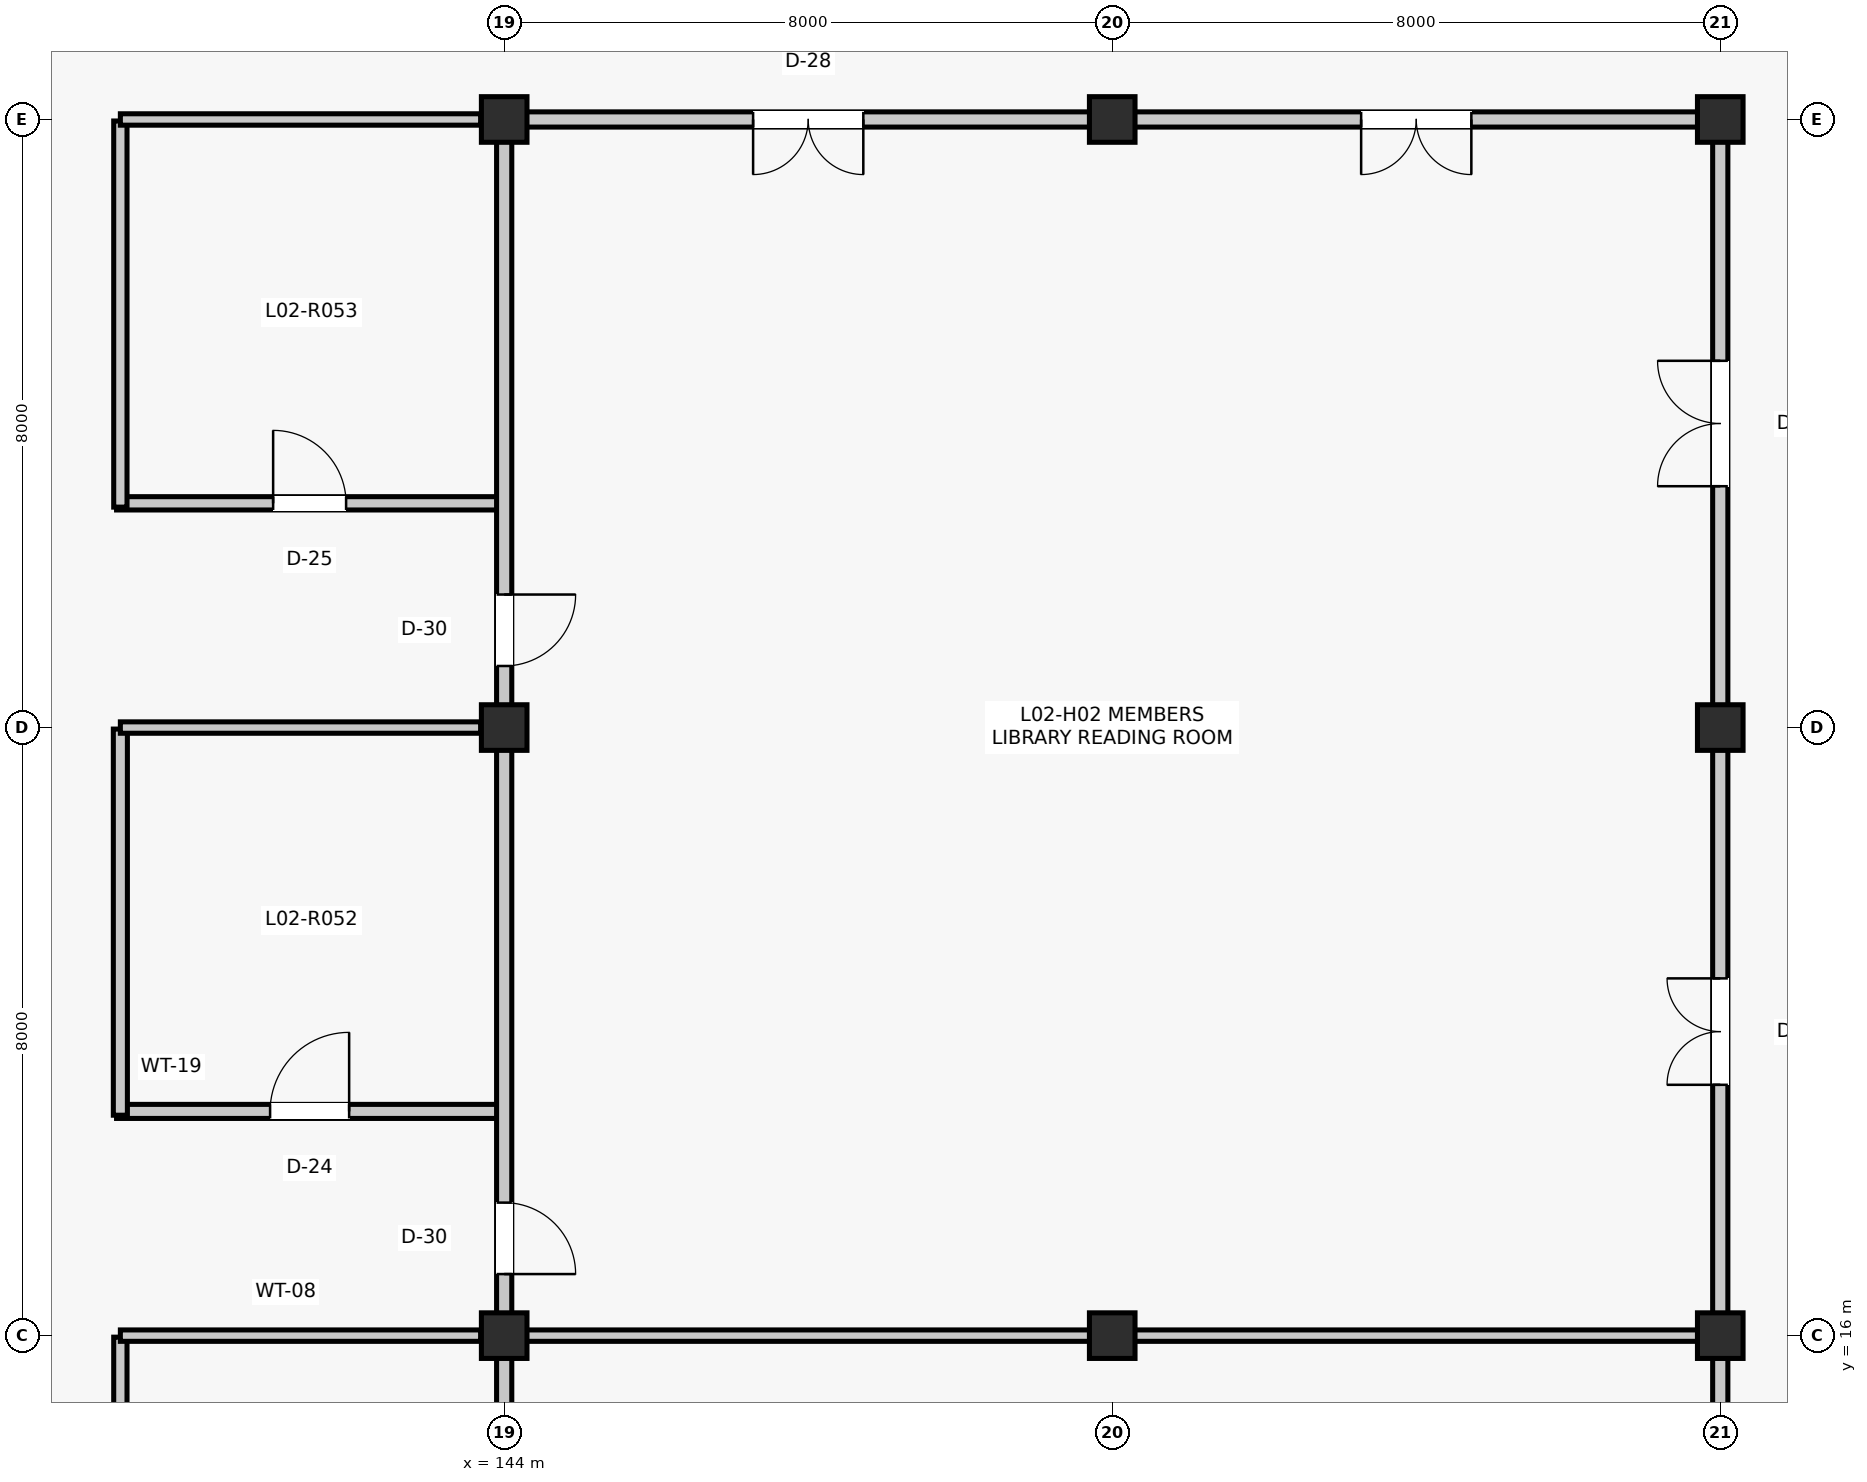
"""IFC4 building model, lengths in metres.
Left out: names, types, materials, properties, quantities, classifications, styles, units other than length and angle.
Written with IfcOpenShell. Run it as: python <this file> out.ifc"""

import sys

from ifc_helpers import new_model, si_unit, direction, frame, frame_2d, origin, origin_2d, place, context, subcontext, project, spatial, rectangle, extrude, element, fill, save


model = new_model("IFC4")
c1 = context("Model", 3, precision=1e-05, world=origin(), true_north=direction((0.0, 1.0)))
c2 = subcontext(c1, "Body", "Model", "MODEL_VIEW")
j1 = project(units=[si_unit("LENGTHUNIT", "METRE"), si_unit("PLANEANGLEUNIT", "RADIAN")], contexts=[c1])
p1 = place(None, origin())
s1 = spatial("IfcSite", under=j1, at=p1, CompositionType="ELEMENT")
p2 = place(p1, origin())
s2 = spatial("IfcBuilding", under=s1, at=p2, CompositionType="ELEMENT")
p3 = place(p2, frame((0.0, 0.0, 9.9)))
s3 = spatial("IfcBuildingStorey", under=s2, at=p3, CompositionType="ELEMENT", Elevation=9.9)
for number, where, z_axis, x_axis in (
    (1, (144.0, 16.0, 0.0), (0.0, 0.0, 1.0), (1.0, 0.0, 0.0)),
    (2, (144.0, 24.0, 0.0), (0.0, 0.0, 1.0), (1.0, 0.0, 0.0)),
    (3, (144.0, 32.0, 0.0), (0.0, 0.0, 1.0), (1.0, 0.0, 0.0)),
    (4, (152.0, 16.0, 0.0), (0.0, 0.0, 1.0), (1.0, 0.0, 0.0)),
    (5, (152.0, 32.0, 0.0), (0.0, 0.0, 1.0), (1.0, 0.0, 0.0)),
    (6, (160.0, 16.0, 0.0), (0.0, 0.0, 1.0), (1.0, 0.0, 0.0)),
    (7, (160.0, 24.0, 0.0), (0.0, 0.0, 1.0), (1.0, 0.0, 0.0)),
    (8, (160.0, 32.0, 0.0), (0.0, 0.0, 1.0), (1.0, 0.0, 0.0)),
):
    element("IfcColumn", number, at=place(p3, frame(where, z_axis=z_axis, x_axis=x_axis)), inside=s3, PredefinedType="COLUMN", context=c2, shape_type="SweptSolid", body=[
        extrude(rectangle(XDim=0.6, YDim=0.6, at=origin_2d()), origin(), (0.0, 0.0, 1.0), 3.96),
    ])
p4 = place(p3, frame((138.95, 10.9, 0.0), z_axis=(0.0, 0.0, 1.0), x_axis=(0.0, 1.0, 0.0)))
e9 = element("IfcWall", 9, at=p4, inside=s3, PredefinedType="PARTITIONING", context=c2, shape_type="SweptSolid", body=[
    extrude(rectangle(XDim=5.08, YDim=0.175, at=frame_2d((2.54, 0.0))), origin(), (0.0, 0.0, 1.0), 3.151),
])
p5 = place(p3, frame((138.95, 16.0, 0.0), z_axis=(0.0, 0.0, 1.0), x_axis=(1.0, 0.0, 0.0)))
e10 = element("IfcWall", 10, at=p5, inside=s3, PredefinedType="PARTITIONING", context=c2, shape_type="SweptSolid", body=[
    extrude(rectangle(XDim=4.74, YDim=0.15, at=frame_2d((2.37, 0.0))), origin(), (0.0, 0.0, 1.0), 3.151),
])
p6 = place(p3, frame((138.9, 18.95, 0.0), z_axis=(0.0, 0.0, 1.0), x_axis=(1.0, 0.0, 0.0)))
e11 = element("IfcWall", 11, at=p6, inside=s3, PredefinedType="PARTITIONING", context=c2, shape_type="SweptSolid", body=[
    extrude(rectangle(XDim=5.08, YDim=0.185, at=frame_2d((2.54, 0.0))), origin(), (0.0, 0.0, 1.0), 3.157),
])
p7 = place(p6, frame((2.02, 0.0, 0.0)))
e12 = element("IfcOpeningElement", 12, at=p7, cuts=e11, PredefinedType="OPENING", context=c2, shape_type="SweptSolid", body=[
    extrude(rectangle(XDim=1.04, YDim=2.18, at=frame_2d((0.52, 1.09))), frame((0.0, 0.103, 0.0), z_axis=(0.0, -1.0, 0.0), x_axis=(1.0, 0.0, 0.0)), (0.0, 0.0, 1.0), 0.205),
])
p8 = place(p3, frame((138.95, 18.9, 0.0), z_axis=(0.0, 0.0, 1.0), x_axis=(0.0, 1.0, 0.0)))
e13 = element("IfcWall", 13, at=p8, inside=s3, PredefinedType="PARTITIONING", context=c2, shape_type="SweptSolid", body=[
    extrude(rectangle(XDim=5.08, YDim=0.185, at=frame_2d((2.54, 0.0))), origin(), (0.0, 0.0, 1.0), 3.082),
])
p9 = place(p3, frame((138.95, 24.0, 0.0), z_axis=(0.0, 0.0, 1.0), x_axis=(1.0, 0.0, 0.0)))
e14 = element("IfcWall", 14, at=p9, inside=s3, PredefinedType="PARTITIONING", context=c2, shape_type="SweptSolid", body=[
    extrude(rectangle(XDim=4.74, YDim=0.15, at=frame_2d((2.37, 0.0))), origin(), (0.0, 0.0, 1.0), 3.082),
])
p10 = place(p3, frame((138.9, 26.95, 0.0), z_axis=(0.0, 0.0, 1.0), x_axis=(1.0, 0.0, 0.0)))
e15 = element("IfcWall", 15, at=p10, inside=s3, PredefinedType="PARTITIONING", context=c2, shape_type="SweptSolid", body=[
    extrude(rectangle(XDim=5.08, YDim=0.175, at=frame_2d((2.54, 0.0))), origin(), (0.0, 0.0, 1.0), 3.227),
])
p11 = place(p10, frame((2.06, 0.0, 0.0)))
e16 = element("IfcOpeningElement", 16, at=p11, cuts=e15, PredefinedType="OPENING", context=c2, shape_type="SweptSolid", body=[
    extrude(rectangle(XDim=0.96, YDim=2.14, at=frame_2d((0.48, 1.07))), frame((0.0, 0.097, 0.0), z_axis=(0.0, -1.0, 0.0), x_axis=(1.0, 0.0, 0.0)), (0.0, 0.0, 1.0), 0.195),
])
p12 = place(p3, frame((138.95, 26.9, 0.0), z_axis=(0.0, 0.0, 1.0), x_axis=(0.0, 1.0, 0.0)))
e17 = element("IfcWall", 17, at=p12, inside=s3, PredefinedType="PARTITIONING", context=c2, shape_type="SweptSolid", body=[
    extrude(rectangle(XDim=5.08, YDim=0.175, at=frame_2d((2.54, 0.0))), origin(), (0.0, 0.0, 1.0), 3.157),
])
p13 = place(p3, frame((138.95, 32.0, 0.0), z_axis=(0.0, 0.0, 1.0), x_axis=(1.0, 0.0, 0.0)))
e18 = element("IfcWall", 18, at=p13, inside=s3, PredefinedType="PARTITIONING", context=c2, shape_type="SweptSolid", body=[
    extrude(rectangle(XDim=4.74, YDim=0.15, at=frame_2d((2.37, 0.0))), origin(), (0.0, 0.0, 1.0), 3.157),
])
p14 = place(p3, frame((144.0, 8.29, 0.0), z_axis=(0.0, 0.0, 1.0), x_axis=(0.0, 1.0, 0.0)))
e19 = element("IfcWall", 19, at=p14, inside=s3, PredefinedType="PARTITIONING", context=c2, shape_type="SweptSolid", body=[
    extrude(rectangle(XDim=7.42, YDim=0.2, at=frame_2d((3.71, 0.0))), origin(), (0.0, 0.0, 1.0), 3.221),
])
p15 = place(p14, frame((0.52, 0.0, 0.0)))
e20 = element("IfcOpeningElement", 20, at=p15, cuts=e19, PredefinedType="OPENING", context=c2, shape_type="SweptSolid", body=[
    extrude(rectangle(XDim=0.94, YDim=2.12, at=frame_2d((0.47, 1.06))), frame((0.0, 0.11, 0.0), z_axis=(0.0, -1.0, 0.0), x_axis=(1.0, 0.0, 0.0)), (0.0, 0.0, 1.0), 0.22),
])
p16 = place(p3, frame((144.0, 16.29, 0.0), z_axis=(0.0, 0.0, 1.0), x_axis=(0.0, 1.0, 0.0)))
e21 = element("IfcWall", 21, at=p16, inside=s3, PredefinedType="PARTITIONING", context=c2, shape_type="SweptSolid", body=[
    extrude(rectangle(XDim=7.42, YDim=0.2, at=frame_2d((3.71, 0.0))), origin(), (0.0, 0.0, 1.0), 3.157),
])
p17 = place(p16, frame((0.52, 0.0, 0.0)))
e22 = element("IfcOpeningElement", 22, at=p17, cuts=e21, PredefinedType="OPENING", context=c2, shape_type="SweptSolid", body=[
    extrude(rectangle(XDim=0.94, YDim=2.12, at=frame_2d((0.47, 1.06))), frame((0.0, 0.11, 0.0), z_axis=(0.0, -1.0, 0.0), x_axis=(1.0, 0.0, 0.0)), (0.0, 0.0, 1.0), 0.22),
])
p18 = place(p3, frame((144.0, 24.29, 0.0), z_axis=(0.0, 0.0, 1.0), x_axis=(0.0, 1.0, 0.0)))
e23 = element("IfcWall", 23, at=p18, inside=s3, PredefinedType="PARTITIONING", context=c2, shape_type="SweptSolid", body=[
    extrude(rectangle(XDim=7.42, YDim=0.2, at=frame_2d((3.71, 0.0))), origin(), (0.0, 0.0, 1.0), 3.227),
])
p19 = place(p18, frame((0.52, 0.0, 0.0)))
e24 = element("IfcOpeningElement", 24, at=p19, cuts=e23, PredefinedType="OPENING", context=c2, shape_type="SweptSolid", body=[
    extrude(rectangle(XDim=0.94, YDim=2.12, at=frame_2d((0.47, 1.06))), frame((0.0, 0.11, 0.0), z_axis=(0.0, -1.0, 0.0), x_axis=(1.0, 0.0, 0.0)), (0.0, 0.0, 1.0), 0.22),
])
p20 = place(p3, frame((144.29, 16.0, 0.0), z_axis=(0.0, 0.0, 1.0), x_axis=(1.0, 0.0, 0.0)))
e25 = element("IfcWall", 25, at=p20, inside=s3, PredefinedType="PARTITIONING", context=c2, shape_type="SweptSolid", body=[
    extrude(rectangle(XDim=7.42, YDim=0.15, at=frame_2d((3.71, 0.0))), origin(), (0.0, 0.0, 1.0), 3.082),
])
p21 = place(p3, frame((144.29, 32.0, 0.0), z_axis=(0.0, 0.0, 1.0), x_axis=(1.0, 0.0, 0.0)))
e26 = element("IfcWall", 26, at=p21, inside=s3, PredefinedType="PARTITIONING", context=c2, shape_type="SweptSolid", body=[
    extrude(rectangle(XDim=7.42, YDim=0.2, at=frame_2d((3.71, 0.0))), origin(), (0.0, 0.0, 1.0), 3.156),
])
p22 = place(p21, frame((2.985, 0.0, 0.0)))
e27 = element("IfcOpeningElement", 27, at=p22, cuts=e26, PredefinedType="OPENING", context=c2, shape_type="SweptSolid", body=[
    extrude(rectangle(XDim=1.45, YDim=2.22, at=frame_2d((0.725, 1.11))), frame((0.0, 0.11, 0.0), z_axis=(0.0, -1.0, 0.0), x_axis=(1.0, 0.0, 0.0)), (0.0, 0.0, 1.0), 0.22),
])
p23 = place(p3, frame((160.0, 8.29, 0.0), z_axis=(0.0, 0.0, 1.0), x_axis=(0.0, 1.0, 0.0)))
e28 = element("IfcWall", 28, at=p23, inside=s3, PredefinedType="PARTITIONING", context=c2, shape_type="SweptSolid", body=[
    extrude(rectangle(XDim=7.42, YDim=0.2, at=frame_2d((3.71, 0.0))), origin(), (0.0, 0.0, 1.0), 3.227),
])
p24 = place(p23, frame((3.06, 0.0, 0.0)))
e29 = element("IfcOpeningElement", 29, at=p24, cuts=e28, PredefinedType="OPENING", context=c2, shape_type="SweptSolid", body=[
    extrude(rectangle(XDim=1.3, YDim=2.2, at=frame_2d((0.65, 1.1))), frame((0.0, 0.11, 0.0), z_axis=(0.0, -1.0, 0.0), x_axis=(1.0, 0.0, 0.0)), (0.0, 0.0, 1.0), 0.22),
])
p25 = place(p3, frame((152.29, 16.0, 0.0), z_axis=(0.0, 0.0, 1.0), x_axis=(1.0, 0.0, 0.0)))
e30 = element("IfcWall", 30, at=p25, inside=s3, PredefinedType="PARTITIONING", context=c2, shape_type="SweptSolid", body=[
    extrude(rectangle(XDim=7.42, YDim=0.15, at=frame_2d((3.71, 0.0))), origin(), (0.0, 0.0, 1.0), 3.157),
])
p26 = place(p3, frame((160.0, 16.29, 0.0), z_axis=(0.0, 0.0, 1.0), x_axis=(0.0, 1.0, 0.0)))
e31 = element("IfcWall", 31, at=p26, inside=s3, PredefinedType="PARTITIONING", context=c2, shape_type="SweptSolid", body=[
    extrude(rectangle(XDim=7.42, YDim=0.2, at=frame_2d((3.71, 0.0))), origin(), (0.0, 0.0, 1.0), 3.151),
])
p27 = place(p26, frame((3.01, 0.0, 0.0)))
e32 = element("IfcOpeningElement", 32, at=p27, cuts=e31, PredefinedType="OPENING", context=c2, shape_type="SweptSolid", body=[
    extrude(rectangle(XDim=1.4, YDim=2.2, at=frame_2d((0.7, 1.1))), frame((0.0, 0.11, 0.0), z_axis=(0.0, -1.0, 0.0), x_axis=(1.0, 0.0, 0.0)), (0.0, 0.0, 1.0), 0.22),
])
p28 = place(p3, frame((160.0, 24.29, 0.0), z_axis=(0.0, 0.0, 1.0), x_axis=(0.0, 1.0, 0.0)))
e33 = element("IfcWall", 33, at=p28, inside=s3, PredefinedType="PARTITIONING", context=c2, shape_type="SweptSolid", body=[
    extrude(rectangle(XDim=7.42, YDim=0.2, at=frame_2d((3.71, 0.0))), origin(), (0.0, 0.0, 1.0), 3.221),
])
p29 = place(p28, frame((2.885, 0.0, 0.0)))
e34 = element("IfcOpeningElement", 34, at=p29, cuts=e33, PredefinedType="OPENING", context=c2, shape_type="SweptSolid", body=[
    extrude(rectangle(XDim=1.65, YDim=2.28, at=frame_2d((0.825, 1.14))), frame((0.0, 0.11, 0.0), z_axis=(0.0, -1.0, 0.0), x_axis=(1.0, 0.0, 0.0)), (0.0, 0.0, 1.0), 0.22),
])
p30 = place(p3, frame((152.29, 32.0, 0.0), z_axis=(0.0, 0.0, 1.0), x_axis=(1.0, 0.0, 0.0)))
e35 = element("IfcWall", 35, at=p30, inside=s3, PredefinedType="PARTITIONING", context=c2, shape_type="SweptSolid", body=[
    extrude(rectangle(XDim=7.42, YDim=0.2, at=frame_2d((3.71, 0.0))), origin(), (0.0, 0.0, 1.0), 3.166),
])
p31 = place(p30, frame((2.985, 0.0, 0.0)))
e36 = element("IfcOpeningElement", 36, at=p31, cuts=e35, PredefinedType="OPENING", context=c2, shape_type="SweptSolid", body=[
    extrude(rectangle(XDim=1.45, YDim=2.22, at=frame_2d((0.725, 1.11))), frame((0.0, 0.11, 0.0), z_axis=(0.0, -1.0, 0.0), x_axis=(1.0, 0.0, 0.0)), (0.0, 0.0, 1.0), 0.22),
])
p32 = place(p7, origin())
e37 = element("IfcDoor", 37, at=p32, inside=s3, OperationType="SINGLE_SWING_RIGHT", PredefinedType="DOOR", context=c2, shape_type="SweptSolid", body=[
    extrude(rectangle(XDim=1.04, YDim=2.18, at=frame_2d((0.52, 1.09))), frame((0.0, 0.025, 0.0), z_axis=(0.0, -1.0, 0.0), x_axis=(1.0, 0.0, 0.0)), (0.0, 0.0, 1.0), 0.05),
])
fill(e12, e37)
p33 = place(p11, origin())
e38 = element("IfcDoor", 38, at=p33, inside=s3, OperationType="SINGLE_SWING_LEFT", PredefinedType="DOOR", context=c2, shape_type="SweptSolid", body=[
    extrude(rectangle(XDim=0.96, YDim=2.14, at=frame_2d((0.48, 1.07))), frame((0.0, 0.025, 0.0), z_axis=(0.0, -1.0, 0.0), x_axis=(1.0, 0.0, 0.0)), (0.0, 0.0, 1.0), 0.05),
])
fill(e16, e38)
p34 = place(p17, frame((0.94, 0.0, 0.0), z_axis=(0.0, 0.0, 1.0), x_axis=(-1.0, 0.0, 0.0)))
e39 = element("IfcDoor", 39, at=p34, inside=s3, OperationType="SINGLE_SWING_LEFT", PredefinedType="DOOR", context=c2, shape_type="SweptSolid", body=[
    extrude(rectangle(XDim=0.94, YDim=2.12, at=frame_2d((0.47, 1.06))), frame((0.0, 0.025, 0.0), z_axis=(0.0, -1.0, 0.0), x_axis=(1.0, 0.0, 0.0)), (0.0, 0.0, 1.0), 0.05),
])
fill(e22, e39)
p35 = place(p19, frame((0.94, 0.0, 0.0), z_axis=(0.0, 0.0, 1.0), x_axis=(-1.0, 0.0, 0.0)))
e40 = element("IfcDoor", 40, at=p35, inside=s3, OperationType="SINGLE_SWING_RIGHT", PredefinedType="DOOR", context=c2, shape_type="SweptSolid", body=[
    extrude(rectangle(XDim=0.94, YDim=2.12, at=frame_2d((0.47, 1.06))), frame((0.0, 0.025, 0.0), z_axis=(0.0, -1.0, 0.0), x_axis=(1.0, 0.0, 0.0)), (0.0, 0.0, 1.0), 0.05),
])
fill(e24, e40)
p36 = place(p22, frame((1.45, 0.0, 0.0), z_axis=(0.0, 0.0, 1.0), x_axis=(-1.0, 0.0, 0.0)))
e41 = element("IfcDoor", 41, at=p36, inside=s3, OperationType="DOUBLE_DOOR_SINGLE_SWING", PredefinedType="DOOR", context=c2, shape_type="SweptSolid", body=[
    extrude(rectangle(XDim=1.45, YDim=2.22, at=frame_2d((0.725, 1.11))), frame((0.0, 0.025, 0.0), z_axis=(0.0, -1.0, 0.0), x_axis=(1.0, 0.0, 0.0)), (0.0, 0.0, 1.0), 0.05),
])
fill(e27, e41)
p37 = place(p27, origin())
e42 = element("IfcDoor", 42, at=p37, inside=s3, OperationType="DOUBLE_DOOR_SINGLE_SWING", PredefinedType="DOOR", context=c2, shape_type="SweptSolid", body=[
    extrude(rectangle(XDim=1.4, YDim=2.2, at=frame_2d((0.7, 1.1))), frame((0.0, 0.025, 0.0), z_axis=(0.0, -1.0, 0.0), x_axis=(1.0, 0.0, 0.0)), (0.0, 0.0, 1.0), 0.05),
])
fill(e32, e42)
p38 = place(p29, origin())
e43 = element("IfcDoor", 43, at=p38, inside=s3, OperationType="DOUBLE_DOOR_SINGLE_SWING", PredefinedType="DOOR", context=c2, shape_type="SweptSolid", body=[
    extrude(rectangle(XDim=1.65, YDim=2.28, at=frame_2d((0.825, 1.14))), frame((0.0, 0.025, 0.0), z_axis=(0.0, -1.0, 0.0), x_axis=(1.0, 0.0, 0.0)), (0.0, 0.0, 1.0), 0.05),
])
fill(e34, e43)
p39 = place(p31, frame((1.45, 0.0, 0.0), z_axis=(0.0, 0.0, 1.0), x_axis=(-1.0, 0.0, 0.0)))
e44 = element("IfcDoor", 44, at=p39, inside=s3, OperationType="DOUBLE_DOOR_SINGLE_SWING", PredefinedType="DOOR", context=c2, shape_type="SweptSolid", body=[
    extrude(rectangle(XDim=1.45, YDim=2.22, at=frame_2d((0.725, 1.11))), frame((0.0, 0.025, 0.0), z_axis=(0.0, -1.0, 0.0), x_axis=(1.0, 0.0, 0.0)), (0.0, 0.0, 1.0), 0.05),
])
fill(e36, e44)
save(model, sys.argv[1])
